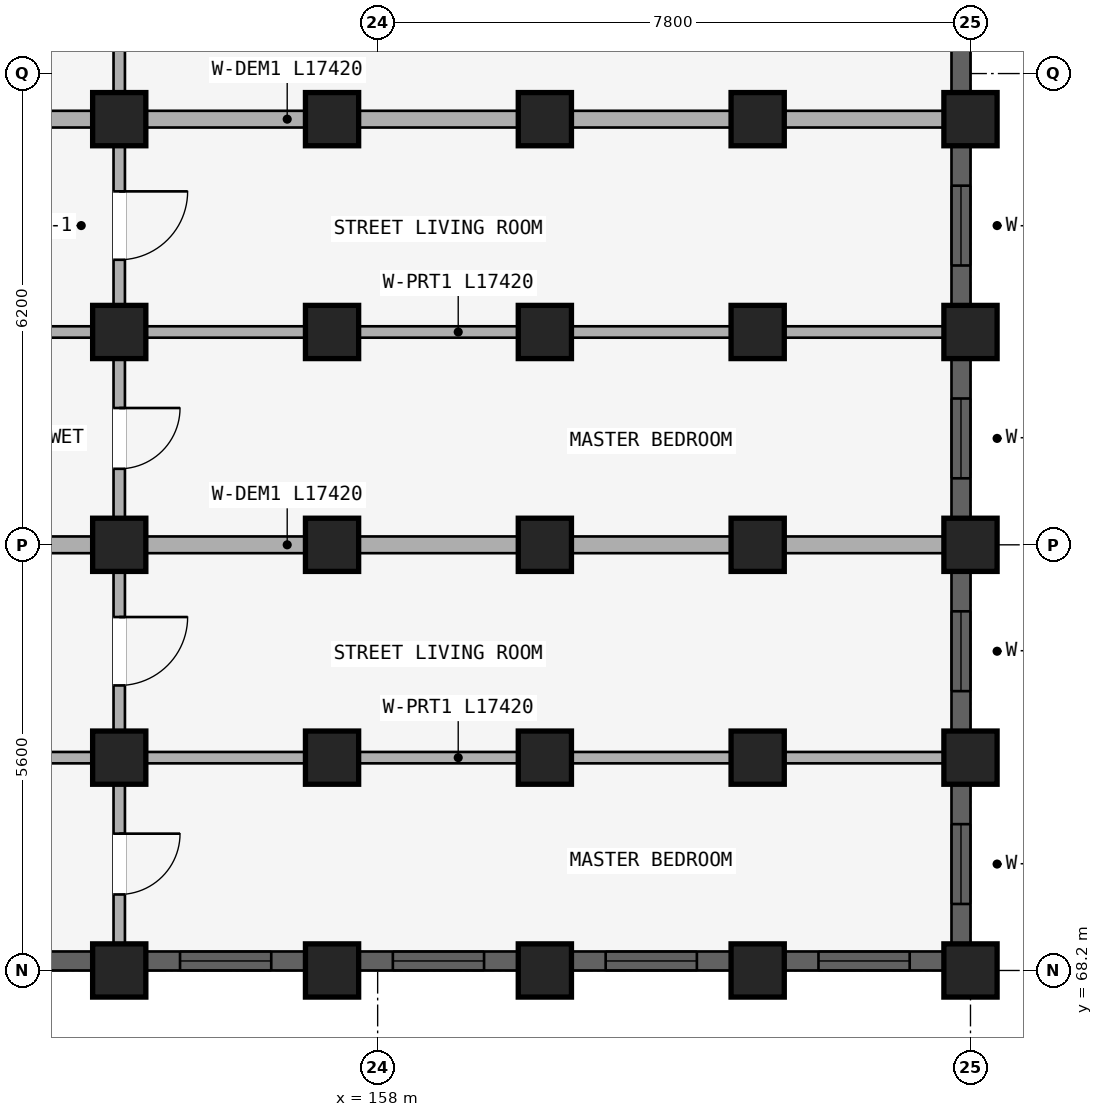
"""IFC4 building model, lengths in metres.
Left out: names, types, materials, properties, quantities, classifications, styles, units other than length and angle.
Written with IfcOpenShell. Run it as: python <this file> out.ifc"""

import sys

from ifc_helpers import new_model, si_unit, direction, frame, frame_2d, origin, origin_2d, place, context, subcontext, project, spatial, rectangle, extrude, element, fill, save


model = new_model("IFC4")
c1 = context("Model", 3, precision=1e-05, world=origin(), true_north=direction((0.0, 1.0)))
c2 = subcontext(c1, "Body", "Model", "MODEL_VIEW")
j1 = project(units=[si_unit("LENGTHUNIT", "METRE"), si_unit("PLANEANGLEUNIT", "RADIAN")], contexts=[c1])
p1 = place(None, origin())
s1 = spatial("IfcSite", under=j1, at=p1, CompositionType="ELEMENT")
p2 = place(p1, origin())
s2 = spatial("IfcBuilding", under=s1, at=p2, CompositionType="ELEMENT")
p3 = place(p2, frame((0.0, 0.0, 21.3)))
s3 = spatial("IfcBuildingStorey", under=s2, at=p3, CompositionType="ELEMENT", Elevation=21.3)
for number, where, z_axis, x_axis in (
    (1, (154.6, 79.4, 0.0), (0.0, 0.0, 1.0), (1.0, 0.0, 0.0)),
    (2, (157.4, 79.4, 0.0), (0.0, 0.0, 1.0), (1.0, 0.0, 0.0)),
    (3, (160.2, 79.4, 0.0), (0.0, 0.0, 1.0), (1.0, 0.0, 0.0)),
    (4, (163.0, 79.4, 0.0), (0.0, 0.0, 1.0), (1.0, 0.0, 0.0)),
    (5, (165.8, 79.4, 0.0), (0.0, 0.0, 1.0), (1.0, 0.0, 0.0)),
    (6, (154.6, 76.6, 0.0), (0.0, 0.0, 1.0), (1.0, 0.0, 0.0)),
    (7, (157.4, 76.6, 0.0), (0.0, 0.0, 1.0), (1.0, 0.0, 0.0)),
    (8, (160.2, 76.6, 0.0), (0.0, 0.0, 1.0), (1.0, 0.0, 0.0)),
    (9, (163.0, 76.6, 0.0), (0.0, 0.0, 1.0), (1.0, 0.0, 0.0)),
    (10, (165.8, 76.6, 0.0), (0.0, 0.0, 1.0), (1.0, 0.0, 0.0)),
    (11, (154.6, 73.8, 0.0), (0.0, 0.0, 1.0), (1.0, 0.0, 0.0)),
    (12, (157.4, 73.8, 0.0), (0.0, 0.0, 1.0), (1.0, 0.0, 0.0)),
    (13, (160.2, 73.8, 0.0), (0.0, 0.0, 1.0), (1.0, 0.0, 0.0)),
    (14, (163.0, 73.8, 0.0), (0.0, 0.0, 1.0), (1.0, 0.0, 0.0)),
    (15, (165.8, 73.8, 0.0), (0.0, 0.0, 1.0), (1.0, 0.0, 0.0)),
    (16, (154.6, 71.0, 0.0), (0.0, 0.0, 1.0), (1.0, 0.0, 0.0)),
    (17, (157.4, 71.0, 0.0), (0.0, 0.0, 1.0), (1.0, 0.0, 0.0)),
    (18, (160.2, 71.0, 0.0), (0.0, 0.0, 1.0), (1.0, 0.0, 0.0)),
    (19, (163.0, 71.0, 0.0), (0.0, 0.0, 1.0), (1.0, 0.0, 0.0)),
    (20, (165.8, 71.0, 0.0), (0.0, 0.0, 1.0), (1.0, 0.0, 0.0)),
    (21, (154.6, 68.2, 0.0), (0.0, 0.0, 1.0), (1.0, 0.0, 0.0)),
    (22, (157.4, 68.2, 0.0), (0.0, 0.0, 1.0), (1.0, 0.0, 0.0)),
    (23, (160.2, 68.2, 0.0), (0.0, 0.0, 1.0), (1.0, 0.0, 0.0)),
    (24, (163.0, 68.2, 0.0), (0.0, 0.0, 1.0), (1.0, 0.0, 0.0)),
    (25, (165.8, 68.2, 0.0), (0.0, 0.0, 1.0), (1.0, 0.0, 0.0)),
):
    element("IfcColumn", number, at=place(p3, frame(where, z_axis=z_axis, x_axis=x_axis)), inside=s3, PredefinedType="COLUMN", context=c2, shape_type="SweptSolid", body=[
        extrude(rectangle(XDim=0.7, YDim=0.7, at=origin_2d()), origin(), (0.0, 0.0, 1.0), 2.93),
    ])
p4 = place(p3, frame((154.6, 83.52, 0.0), z_axis=(0.0, 0.0, 1.0), x_axis=(0.0, -1.0, 0.0)))
e26 = element("IfcWall", 26, at=p4, inside=s3, PredefinedType="PARTITIONING", context=c2, shape_type="SweptSolid", body=[
    extrude(rectangle(XDim=4.04, YDim=0.15, at=frame_2d((2.02, 0.0))), origin(), (0.0, 0.0, 1.0), 2.372),
])
p5 = place(p4, frame((1.57, 0.0, 0.0)))
e27 = element("IfcOpeningElement", 27, at=p5, cuts=e26, PredefinedType="OPENING", context=c2, shape_type="SweptSolid", body=[
    extrude(rectangle(XDim=0.9, YDim=2.1, at=frame_2d((0.45, 1.05))), frame((0.0, 0.085, 0.0), z_axis=(0.0, -1.0, 0.0), x_axis=(1.0, 0.0, 0.0)), (0.0, 0.0, 1.0), 0.17),
])
p6 = place(p3, frame((154.6, 79.32, 0.0), z_axis=(0.0, 0.0, 1.0), x_axis=(0.0, -1.0, 0.0)))
e28 = element("IfcWall", 28, at=p6, inside=s3, PredefinedType="PLUMBINGWALL", context=c2, shape_type="SweptSolid", body=[
    extrude(rectangle(XDim=2.64, YDim=0.15, at=frame_2d((1.32, 0.0))), origin(), (0.0, 0.0, 1.0), 2.372),
])
p7 = place(p6, frame((0.87, 0.0, 0.0)))
e29 = element("IfcOpeningElement", 29, at=p7, cuts=e28, PredefinedType="OPENING", context=c2, shape_type="SweptSolid", body=[
    extrude(rectangle(XDim=0.9, YDim=2.1, at=frame_2d((0.45, 1.05))), frame((0.0, 0.085, 0.0), z_axis=(0.0, -1.0, 0.0), x_axis=(1.0, 0.0, 0.0)), (0.0, 0.0, 1.0), 0.17),
])
p8 = place(p3, frame((148.1, 79.4, 0.0), z_axis=(0.0, 0.0, 1.0), x_axis=(1.0, 0.0, 0.0)))
e30 = element("IfcWall", 30, at=p8, inside=s3, PredefinedType="STANDARD", context=c2, shape_type="SweptSolid", body=[
    extrude(rectangle(XDim=17.42, YDim=0.22, at=frame_2d((8.71, 0.0))), origin(), (0.0, 0.0, 1.0), 2.372),
])
p9 = place(p3, frame((154.6, 76.52, 0.0), z_axis=(0.0, 0.0, 1.0), x_axis=(0.0, -1.0, 0.0)))
e31 = element("IfcWall", 31, at=p9, inside=s3, PredefinedType="PLUMBINGWALL", context=c2, shape_type="SweptSolid", body=[
    extrude(rectangle(XDim=2.64, YDim=0.15, at=frame_2d((1.32, 0.0))), origin(), (0.0, 0.0, 1.0), 2.372),
])
p10 = place(p9, frame((0.92, 0.0, 0.0)))
e32 = element("IfcOpeningElement", 32, at=p10, cuts=e31, PredefinedType="OPENING", context=c2, shape_type="SweptSolid", body=[
    extrude(rectangle(XDim=0.8, YDim=2.1, at=frame_2d((0.4, 1.05))), frame((0.0, 0.085, 0.0), z_axis=(0.0, -1.0, 0.0), x_axis=(1.0, 0.0, 0.0)), (0.0, 0.0, 1.0), 0.17),
])
p11 = place(p3, frame((148.1, 76.6, 0.0), z_axis=(0.0, 0.0, 1.0), x_axis=(1.0, 0.0, 0.0)))
e33 = element("IfcWall", 33, at=p11, inside=s3, PredefinedType="PARTITIONING", context=c2, shape_type="SweptSolid", body=[
    extrude(rectangle(XDim=17.42, YDim=0.15, at=frame_2d((8.71, 0.0))), origin(), (0.0, 0.0, 1.0), 2.372),
])
p12 = place(p11, frame((2.75, 0.0, 0.0)))
e34 = element("IfcOpeningElement", 34, at=p12, cuts=e33, PredefinedType="OPENING", context=c2, shape_type="SweptSolid", body=[
    extrude(rectangle(XDim=0.9, YDim=2.1, at=frame_2d((0.45, 1.05))), frame((0.0, 0.085, 0.0), z_axis=(0.0, -1.0, 0.0), x_axis=(1.0, 0.0, 0.0)), (0.0, 0.0, 1.0), 0.17),
])
p13 = place(p3, frame((154.6, 73.72, 0.0), z_axis=(0.0, 0.0, 1.0), x_axis=(0.0, -1.0, 0.0)))
e35 = element("IfcWall", 35, at=p13, inside=s3, PredefinedType="PLUMBINGWALL", context=c2, shape_type="SweptSolid", body=[
    extrude(rectangle(XDim=2.64, YDim=0.15, at=frame_2d((1.32, 0.0))), origin(), (0.0, 0.0, 1.0), 2.372),
])
p14 = place(p13, frame((0.87, 0.0, 0.0)))
e36 = element("IfcOpeningElement", 36, at=p14, cuts=e35, PredefinedType="OPENING", context=c2, shape_type="SweptSolid", body=[
    extrude(rectangle(XDim=0.9, YDim=2.1, at=frame_2d((0.45, 1.05))), frame((0.0, 0.085, 0.0), z_axis=(0.0, -1.0, 0.0), x_axis=(1.0, 0.0, 0.0)), (0.0, 0.0, 1.0), 0.17),
])
p15 = place(p3, frame((148.1, 73.8, 0.0), z_axis=(0.0, 0.0, 1.0), x_axis=(1.0, 0.0, 0.0)))
e37 = element("IfcWall", 37, at=p15, inside=s3, PredefinedType="STANDARD", context=c2, shape_type="SweptSolid", body=[
    extrude(rectangle(XDim=17.42, YDim=0.22, at=frame_2d((8.71, 0.0))), origin(), (0.0, 0.0, 1.0), 2.372),
])
p16 = place(p3, frame((154.6, 70.92, 0.0), z_axis=(0.0, 0.0, 1.0), x_axis=(0.0, -1.0, 0.0)))
e38 = element("IfcWall", 38, at=p16, inside=s3, PredefinedType="PLUMBINGWALL", context=c2, shape_type="SweptSolid", body=[
    extrude(rectangle(XDim=2.64, YDim=0.15, at=frame_2d((1.32, 0.0))), origin(), (0.0, 0.0, 1.0), 2.372),
])
p17 = place(p16, frame((0.92, 0.0, 0.0)))
e39 = element("IfcOpeningElement", 39, at=p17, cuts=e38, PredefinedType="OPENING", context=c2, shape_type="SweptSolid", body=[
    extrude(rectangle(XDim=0.8, YDim=2.1, at=frame_2d((0.4, 1.05))), frame((0.0, 0.085, 0.0), z_axis=(0.0, -1.0, 0.0), x_axis=(1.0, 0.0, 0.0)), (0.0, 0.0, 1.0), 0.17),
])
p18 = place(p3, frame((148.1, 71.0, 0.0), z_axis=(0.0, 0.0, 1.0), x_axis=(1.0, 0.0, 0.0)))
e40 = element("IfcWall", 40, at=p18, inside=s3, PredefinedType="PARTITIONING", context=c2, shape_type="SweptSolid", body=[
    extrude(rectangle(XDim=17.42, YDim=0.15, at=frame_2d((8.71, 0.0))), origin(), (0.0, 0.0, 1.0), 2.372),
])
p19 = place(p18, frame((2.75, 0.0, 0.0)))
e41 = element("IfcOpeningElement", 41, at=p19, cuts=e40, PredefinedType="OPENING", context=c2, shape_type="SweptSolid", body=[
    extrude(rectangle(XDim=0.9, YDim=2.1, at=frame_2d((0.45, 1.05))), frame((0.0, 0.085, 0.0), z_axis=(0.0, -1.0, 0.0), x_axis=(1.0, 0.0, 0.0)), (0.0, 0.0, 1.0), 0.17),
])
p20 = place(p3, frame((165.675, 83.247, 0.0), z_axis=(0.0, 0.0, 1.0), x_axis=(0.0, -1.0, 0.0)))
e42 = element("IfcWall", 42, at=p20, inside=s3, PredefinedType="STANDARD", context=c2, shape_type="SweptSolid", body=[
    extrude(rectangle(XDim=3.493, YDim=0.25, at=frame_2d((1.747, 0.0))), origin(), (0.0, 0.0, 1.0), 2.472),
])
p21 = place(p20, frame((1.221, 0.0, 0.88)))
e43 = element("IfcOpeningElement", 43, at=p21, cuts=e42, PredefinedType="OPENING", context=c2, shape_type="SweptSolid", body=[
    extrude(rectangle(XDim=1.05, YDim=1.25, at=frame_2d((0.525, 0.625))), frame((0.0, 0.135, 0.0), z_axis=(0.0, -1.0, 0.0), x_axis=(1.0, 0.0, 0.0)), (0.0, 0.0, 1.0), 0.27),
])
p22 = place(p3, frame((165.675, 79.046, 0.0), z_axis=(0.0, 0.0, 1.0), x_axis=(0.0, -1.0, 0.0)))
e44 = element("IfcWall", 44, at=p22, inside=s3, PredefinedType="STANDARD", context=c2, shape_type="SweptSolid", body=[
    extrude(rectangle(XDim=2.093, YDim=0.25, at=frame_2d((1.046, 0.0))), origin(), (0.0, 0.0, 1.0), 2.472),
])
p23 = place(p22, frame((0.521, 0.0, 0.88)))
e45 = element("IfcOpeningElement", 45, at=p23, cuts=e44, PredefinedType="OPENING", context=c2, shape_type="SweptSolid", body=[
    extrude(rectangle(XDim=1.05, YDim=1.25, at=frame_2d((0.525, 0.625))), frame((0.0, 0.135, 0.0), z_axis=(0.0, -1.0, 0.0), x_axis=(1.0, 0.0, 0.0)), (0.0, 0.0, 1.0), 0.27),
])
p24 = place(p3, frame((165.675, 76.247, 0.0), z_axis=(0.0, 0.0, 1.0), x_axis=(0.0, -1.0, 0.0)))
e46 = element("IfcWall", 46, at=p24, inside=s3, PredefinedType="STANDARD", context=c2, shape_type="SweptSolid", body=[
    extrude(rectangle(XDim=2.093, YDim=0.25, at=frame_2d((1.046, 0.0))), origin(), (0.0, 0.0, 1.0), 2.472),
])
p25 = place(p24, frame((0.521, 0.0, 0.88)))
e47 = element("IfcOpeningElement", 47, at=p25, cuts=e46, PredefinedType="OPENING", context=c2, shape_type="SweptSolid", body=[
    extrude(rectangle(XDim=1.05, YDim=1.25, at=frame_2d((0.525, 0.625))), frame((0.0, 0.135, 0.0), z_axis=(0.0, -1.0, 0.0), x_axis=(1.0, 0.0, 0.0)), (0.0, 0.0, 1.0), 0.27),
])
p26 = place(p3, frame((165.675, 73.447, 0.0), z_axis=(0.0, 0.0, 1.0), x_axis=(0.0, -1.0, 0.0)))
e48 = element("IfcWall", 48, at=p26, inside=s3, PredefinedType="STANDARD", context=c2, shape_type="SweptSolid", body=[
    extrude(rectangle(XDim=2.093, YDim=0.25, at=frame_2d((1.046, 0.0))), origin(), (0.0, 0.0, 1.0), 2.472),
])
p27 = place(p26, frame((0.521, 0.0, 0.88)))
e49 = element("IfcOpeningElement", 49, at=p27, cuts=e48, PredefinedType="OPENING", context=c2, shape_type="SweptSolid", body=[
    extrude(rectangle(XDim=1.05, YDim=1.25, at=frame_2d((0.525, 0.625))), frame((0.0, 0.135, 0.0), z_axis=(0.0, -1.0, 0.0), x_axis=(1.0, 0.0, 0.0)), (0.0, 0.0, 1.0), 0.27),
])
p28 = place(p3, frame((165.675, 70.646, 0.0), z_axis=(0.0, 0.0, 1.0), x_axis=(0.0, -1.0, 0.0)))
e50 = element("IfcWall", 50, at=p28, inside=s3, PredefinedType="STANDARD", context=c2, shape_type="SweptSolid", body=[
    extrude(rectangle(XDim=2.093, YDim=0.25, at=frame_2d((1.046, 0.0))), origin(), (0.0, 0.0, 1.0), 2.472),
])
p29 = place(p28, frame((0.521, 0.0, 0.88)))
e51 = element("IfcOpeningElement", 51, at=p29, cuts=e50, PredefinedType="OPENING", context=c2, shape_type="SweptSolid", body=[
    extrude(rectangle(XDim=1.05, YDim=1.25, at=frame_2d((0.525, 0.625))), frame((0.0, 0.135, 0.0), z_axis=(0.0, -1.0, 0.0), x_axis=(1.0, 0.0, 0.0)), (0.0, 0.0, 1.0), 0.27),
])
p30 = place(p3, frame((148.229, 68.325, 0.0), z_axis=(0.0, 0.0, 1.0), x_axis=(1.0, 0.0, 0.0)))
e52 = element("IfcWall", 52, at=p30, inside=s3, PredefinedType="STANDARD", context=c2, shape_type="SweptSolid", body=[
    extrude(rectangle(XDim=6.018, YDim=0.25, at=frame_2d((3.009, 0.0))), origin(), (0.0, 0.0, 1.0), 2.372),
])
p31 = place(p30, frame((2.322, 0.0, 0.522)))
e53 = element("IfcOpeningElement", 53, at=p31, cuts=e52, PredefinedType="OPENING", context=c2, shape_type="SweptSolid", body=[
    extrude(rectangle(XDim=1.5, YDim=1.65, at=frame_2d((0.75, 0.825))), frame((0.0, 0.135, 0.0), z_axis=(0.0, -1.0, 0.0), x_axis=(1.0, 0.0, 0.0)), (0.0, 0.0, 1.0), 0.27),
])
p32 = place(p3, frame((154.954, 68.325, 0.0), z_axis=(0.0, 0.0, 1.0), x_axis=(1.0, 0.0, 0.0)))
e54 = element("IfcWall", 54, at=p32, inside=s3, PredefinedType="STANDARD", context=c2, shape_type="SweptSolid", body=[
    extrude(rectangle(XDim=2.093, YDim=0.25, at=frame_2d((1.046, 0.0))), origin(), (0.0, 0.0, 1.0), 2.372),
])
p33 = place(p32, frame((0.447, 0.0, 0.672)))
e55 = element("IfcOpeningElement", 55, at=p33, cuts=e54, PredefinedType="OPENING", context=c2, shape_type="SweptSolid", body=[
    extrude(rectangle(XDim=1.2, YDim=1.5, at=frame_2d((0.6, 0.75))), frame((0.0, 0.135, 0.0), z_axis=(0.0, -1.0, 0.0), x_axis=(1.0, 0.0, 0.0)), (0.0, 0.0, 1.0), 0.27),
])
p34 = place(p3, frame((157.753, 68.325, 0.0), z_axis=(0.0, 0.0, 1.0), x_axis=(1.0, 0.0, 0.0)))
e56 = element("IfcWall", 56, at=p34, inside=s3, PredefinedType="STANDARD", context=c2, shape_type="SweptSolid", body=[
    extrude(rectangle(XDim=2.093, YDim=0.25, at=frame_2d((1.046, 0.0))), origin(), (0.0, 0.0, 1.0), 2.372),
])
p35 = place(p34, frame((0.447, 0.0, 0.672)))
e57 = element("IfcOpeningElement", 57, at=p35, cuts=e56, PredefinedType="OPENING", context=c2, shape_type="SweptSolid", body=[
    extrude(rectangle(XDim=1.2, YDim=1.5, at=frame_2d((0.6, 0.75))), frame((0.0, 0.135, 0.0), z_axis=(0.0, -1.0, 0.0), x_axis=(1.0, 0.0, 0.0)), (0.0, 0.0, 1.0), 0.27),
])
p36 = place(p3, frame((160.553, 68.325, 0.0), z_axis=(0.0, 0.0, 1.0), x_axis=(1.0, 0.0, 0.0)))
e58 = element("IfcWall", 58, at=p36, inside=s3, PredefinedType="STANDARD", context=c2, shape_type="SweptSolid", body=[
    extrude(rectangle(XDim=2.093, YDim=0.25, at=frame_2d((1.046, 0.0))), origin(), (0.0, 0.0, 1.0), 2.372),
])
p37 = place(p36, frame((0.447, 0.0, 0.672)))
e59 = element("IfcOpeningElement", 59, at=p37, cuts=e58, PredefinedType="OPENING", context=c2, shape_type="SweptSolid", body=[
    extrude(rectangle(XDim=1.2, YDim=1.5, at=frame_2d((0.6, 0.75))), frame((0.0, 0.135, 0.0), z_axis=(0.0, -1.0, 0.0), x_axis=(1.0, 0.0, 0.0)), (0.0, 0.0, 1.0), 0.27),
])
p38 = place(p3, frame((163.354, 68.325, 0.0), z_axis=(0.0, 0.0, 1.0), x_axis=(1.0, 0.0, 0.0)))
e60 = element("IfcWall", 60, at=p38, inside=s3, PredefinedType="STANDARD", context=c2, shape_type="SweptSolid", body=[
    extrude(rectangle(XDim=2.093, YDim=0.25, at=frame_2d((1.046, 0.0))), origin(), (0.0, 0.0, 1.0), 2.372),
])
p39 = place(p38, frame((0.447, 0.0, 0.672)))
e61 = element("IfcOpeningElement", 61, at=p39, cuts=e60, PredefinedType="OPENING", context=c2, shape_type="SweptSolid", body=[
    extrude(rectangle(XDim=1.2, YDim=1.5, at=frame_2d((0.6, 0.75))), frame((0.0, 0.135, 0.0), z_axis=(0.0, -1.0, 0.0), x_axis=(1.0, 0.0, 0.0)), (0.0, 0.0, 1.0), 0.27),
])
p40 = place(p23, origin())
e62 = element("IfcWindow", 62, at=p40, inside=s3, PartitioningType="SINGLE_PANEL", PredefinedType="WINDOW", context=c2, shape_type="SweptSolid", body=[
    extrude(rectangle(XDim=1.05, YDim=1.25, at=frame_2d((0.525, 0.625))), frame((0.0, 0.03, 0.0), z_axis=(0.0, -1.0, 0.0), x_axis=(1.0, 0.0, 0.0)), (0.0, 0.0, 1.0), 0.06),
])
fill(e45, e62)
p41 = place(p25, origin())
e63 = element("IfcWindow", 63, at=p41, inside=s3, PartitioningType="SINGLE_PANEL", PredefinedType="WINDOW", context=c2, shape_type="SweptSolid", body=[
    extrude(rectangle(XDim=1.05, YDim=1.25, at=frame_2d((0.525, 0.625))), frame((0.0, 0.03, 0.0), z_axis=(0.0, -1.0, 0.0), x_axis=(1.0, 0.0, 0.0)), (0.0, 0.0, 1.0), 0.06),
])
fill(e47, e63)
p42 = place(p27, origin())
e64 = element("IfcWindow", 64, at=p42, inside=s3, PartitioningType="SINGLE_PANEL", PredefinedType="WINDOW", context=c2, shape_type="SweptSolid", body=[
    extrude(rectangle(XDim=1.05, YDim=1.25, at=frame_2d((0.525, 0.625))), frame((0.0, 0.03, 0.0), z_axis=(0.0, -1.0, 0.0), x_axis=(1.0, 0.0, 0.0)), (0.0, 0.0, 1.0), 0.06),
])
fill(e49, e64)
p43 = place(p29, origin())
e65 = element("IfcWindow", 65, at=p43, inside=s3, PartitioningType="SINGLE_PANEL", PredefinedType="WINDOW", context=c2, shape_type="SweptSolid", body=[
    extrude(rectangle(XDim=1.05, YDim=1.25, at=frame_2d((0.525, 0.625))), frame((0.0, 0.03, 0.0), z_axis=(0.0, -1.0, 0.0), x_axis=(1.0, 0.0, 0.0)), (0.0, 0.0, 1.0), 0.06),
])
fill(e51, e65)
p44 = place(p33, origin())
e66 = element("IfcWindow", 66, at=p44, inside=s3, PartitioningType="SINGLE_PANEL", PredefinedType="WINDOW", context=c2, shape_type="SweptSolid", body=[
    extrude(rectangle(XDim=1.2, YDim=1.5, at=frame_2d((0.6, 0.75))), frame((0.0, 0.03, 0.0), z_axis=(0.0, -1.0, 0.0), x_axis=(1.0, 0.0, 0.0)), (0.0, 0.0, 1.0), 0.06),
])
fill(e55, e66)
p45 = place(p35, origin())
e67 = element("IfcWindow", 67, at=p45, inside=s3, PartitioningType="SINGLE_PANEL", PredefinedType="WINDOW", context=c2, shape_type="SweptSolid", body=[
    extrude(rectangle(XDim=1.2, YDim=1.5, at=frame_2d((0.6, 0.75))), frame((0.0, 0.03, 0.0), z_axis=(0.0, -1.0, 0.0), x_axis=(1.0, 0.0, 0.0)), (0.0, 0.0, 1.0), 0.06),
])
fill(e57, e67)
p46 = place(p37, origin())
e68 = element("IfcWindow", 68, at=p46, inside=s3, PartitioningType="SINGLE_PANEL", PredefinedType="WINDOW", context=c2, shape_type="SweptSolid", body=[
    extrude(rectangle(XDim=1.2, YDim=1.5, at=frame_2d((0.6, 0.75))), frame((0.0, 0.03, 0.0), z_axis=(0.0, -1.0, 0.0), x_axis=(1.0, 0.0, 0.0)), (0.0, 0.0, 1.0), 0.06),
])
fill(e59, e68)
p47 = place(p39, origin())
e69 = element("IfcWindow", 69, at=p47, inside=s3, PartitioningType="SINGLE_PANEL", PredefinedType="WINDOW", context=c2, shape_type="SweptSolid", body=[
    extrude(rectangle(XDim=1.2, YDim=1.5, at=frame_2d((0.6, 0.75))), frame((0.0, 0.03, 0.0), z_axis=(0.0, -1.0, 0.0), x_axis=(1.0, 0.0, 0.0)), (0.0, 0.0, 1.0), 0.06),
])
fill(e61, e69)
p48 = place(p7, origin())
e70 = element("IfcDoor", 70, at=p48, inside=s3, OperationType="SINGLE_SWING_LEFT", PredefinedType="DOOR", context=c2, shape_type="SweptSolid", body=[
    extrude(rectangle(XDim=0.9, YDim=2.1, at=frame_2d((0.45, 1.05))), frame((0.0, 0.025, 0.0), z_axis=(0.0, -1.0, 0.0), x_axis=(1.0, 0.0, 0.0)), (0.0, 0.0, 1.0), 0.05),
])
fill(e29, e70)
p49 = place(p10, origin())
e71 = element("IfcDoor", 71, at=p49, inside=s3, OperationType="SINGLE_SWING_LEFT", PredefinedType="DOOR", context=c2, shape_type="SweptSolid", body=[
    extrude(rectangle(XDim=0.8, YDim=2.1, at=frame_2d((0.4, 1.05))), frame((0.0, 0.025, 0.0), z_axis=(0.0, -1.0, 0.0), x_axis=(1.0, 0.0, 0.0)), (0.0, 0.0, 1.0), 0.05),
])
fill(e32, e71)
p50 = place(p14, origin())
e72 = element("IfcDoor", 72, at=p50, inside=s3, OperationType="SINGLE_SWING_LEFT", PredefinedType="DOOR", context=c2, shape_type="SweptSolid", body=[
    extrude(rectangle(XDim=0.9, YDim=2.1, at=frame_2d((0.45, 1.05))), frame((0.0, 0.025, 0.0), z_axis=(0.0, -1.0, 0.0), x_axis=(1.0, 0.0, 0.0)), (0.0, 0.0, 1.0), 0.05),
])
fill(e36, e72)
p51 = place(p17, origin())
e73 = element("IfcDoor", 73, at=p51, inside=s3, OperationType="SINGLE_SWING_LEFT", PredefinedType="DOOR", context=c2, shape_type="SweptSolid", body=[
    extrude(rectangle(XDim=0.8, YDim=2.1, at=frame_2d((0.4, 1.05))), frame((0.0, 0.025, 0.0), z_axis=(0.0, -1.0, 0.0), x_axis=(1.0, 0.0, 0.0)), (0.0, 0.0, 1.0), 0.05),
])
fill(e39, e73)
save(model, sys.argv[1])
